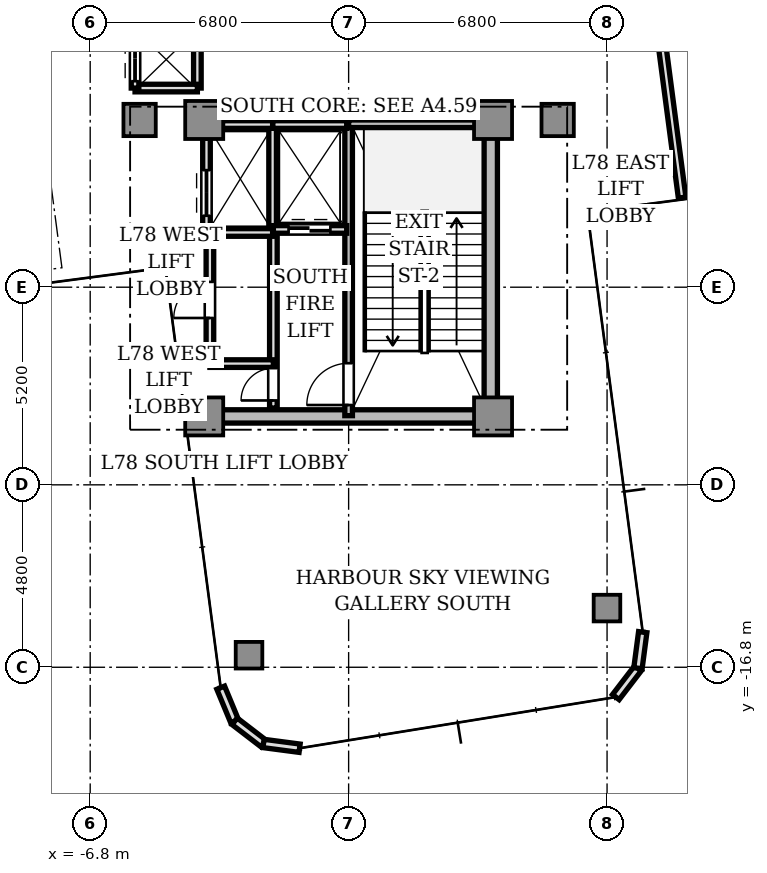
"""IFC4 building model, lengths in metres.
Left out: names, types, materials, properties, quantities, classifications, styles, units other than length and angle.
Written with IfcOpenShell. Run it as: python <this file> out.ifc"""

import sys

from ifc_helpers import new_model, si_unit, direction, frame, frame_2d, origin, origin_2d, place, context, subcontext, project, spatial, rectangle, extrude, source, transform, mapped, element, fill, save


model = new_model("IFC4")
c1 = context("Model", 3, precision=1e-05, world=origin(), true_north=direction((0.0, 1.0)))
c2 = subcontext(c1, "Body", "Model", "MODEL_VIEW")
j1 = project(units=[si_unit("LENGTHUNIT", "METRE"), si_unit("PLANEANGLEUNIT", "RADIAN")], contexts=[c1])
p1 = place(None, origin())
s1 = spatial("IfcSite", under=j1, at=p1, CompositionType="ELEMENT")
p2 = place(p1, origin())
s2 = spatial("IfcBuilding", under=s1, at=p2, CompositionType="ELEMENT")
p3 = place(p2, frame((0.0, 0.0, 280.3)))
s3 = spatial("IfcBuildingStorey", under=s2, at=p3, CompositionType="ELEMENT", Elevation=280.3)
p4 = place(p3, frame((-3.55, -10.2, 0.0), z_axis=(0.0, 0.0, 1.0), x_axis=(1.0, 0.0, 0.0)))
e1 = element("IfcWall", 1, at=p4, inside=s3, PredefinedType="SHEAR", context=c2, shape_type="SweptSolid", body=[
    extrude(rectangle(XDim=7.1, YDim=0.35, at=frame_2d((3.55, 0.0))), origin(), (0.0, 0.0, 1.0), 4.5),
])
p5 = place(p3, frame((3.74, -9.75, 0.0), z_axis=(0.0, 0.0, 1.0), x_axis=(0.0, 1.0, 0.0)))
e2 = element("IfcWall", 2, at=p5, inside=s3, PredefinedType="SHEAR", context=c2, shape_type="SweptSolid", body=[
    extrude(rectangle(XDim=6.9, YDim=0.35, at=frame_2d((3.45, 0.0))), origin(), (0.0, 0.0, 1.0), 4.5),
])
m1 = source(origin(), c2, "Body", "SweptSolid", [
    extrude(rectangle(XDim=1.0, YDim=1.0, at=origin_2d()), origin(), (0.0, 0.0, 1.0), 4.5),
])
for number, where, z_axis, x_axis in (
    (3, (-3.8, -2.4, 0.0), (0.0, 0.0, 1.0), (1.0, 0.0, 0.0)),
    (4, (3.8, -2.4, 0.0), (0.0, 0.0, 1.0), (1.0, 0.0, 0.0)),
    (5, (-3.8, -10.2, 0.0), (0.0, 0.0, 1.0), (1.0, 0.0, 0.0)),
    (6, (3.8, -10.2, 0.0), (0.0, 0.0, 1.0), (1.0, 0.0, 0.0)),
):
    element("IfcColumn", number, at=place(p3, frame(where, z_axis=z_axis, x_axis=x_axis)), inside=s3, PredefinedType="COLUMN", context=c2, shape_type="MappedRepresentation", body=[
        mapped(m1, transform((0.0, 0.0, 0.0), scale=1.0)),
    ])
m2 = source(origin(), c2, "Body", "SweptSolid", [
    extrude(rectangle(XDim=0.85, YDim=0.85, at=origin_2d()), origin(), (0.0, 0.0, 1.0), 4.5),
])
for number, where, z_axis, x_axis in (
    (7, (5.5, -2.4, 0.0), (0.0, 0.0, 1.0), (1.0, 0.0, 0.0)),
    (8, (-5.5, -2.4, 0.0), (0.0, 0.0, 1.0), (1.0, 0.0, 0.0)),
):
    element("IfcColumn", number, at=place(p3, frame(where, z_axis=z_axis, x_axis=x_axis)), inside=s3, PredefinedType="COLUMN", context=c2, shape_type="MappedRepresentation", body=[
        mapped(m2, transform((0.0, 0.0, 0.0), scale=1.0)),
    ])
m3 = source(origin(), c2, "Body", "SweptSolid", [
    extrude(rectangle(XDim=0.7, YDim=0.7, at=origin_2d()), origin(), (0.0, 0.0, 1.0), 4.5),
])
for number, where, z_axis, x_axis in (
    (9, (-2.621, -16.483, 0.0), (0.0, 0.0, 1.0), (1.0, 0.0, 0.0)),
    (10, (6.798, -15.243, 0.0), (0.0, 0.0, 1.0), (1.0, 0.0, 0.0)),
):
    element("IfcColumn", number, at=place(p3, frame(where, z_axis=z_axis, x_axis=x_axis)), inside=s3, PredefinedType="COLUMN", context=c2, shape_type="MappedRepresentation", body=[
        mapped(m3, transform((0.0, 0.0, 0.0), scale=1.0)),
    ])
for number, where, z_axis, x_axis in (
    (11, (-3.366, -17.338, 0.0), (0.0, 0.0, 1.0), (0.383, -0.924, 0.0)),
    (12, (-2.999, -18.222, 0.0), (0.0, 0.0, 1.0), (0.793, -0.609, 0.0)),
    (13, (-2.24, -18.805, 0.0), (0.0, 0.0, 1.0), (0.991, -0.131, 0.0)),
):
    element("IfcWall", number, at=place(p3, frame(where, z_axis=z_axis, x_axis=x_axis)), inside=s3, PredefinedType="STANDARD", context=c2, shape_type="SweptSolid", body=[
        extrude(rectangle(XDim=0.958, YDim=0.22, at=frame_2d((0.479, 0.0))), origin(), (0.0, 0.0, 1.0), 4.5),
    ])
p6 = place(p3, frame((7.031, -17.585, 0.0), z_axis=(0.0, 0.0, 1.0), x_axis=(0.60861352168, 0.793466811674, 0.0)))
e14 = element("IfcWall", 14, at=p6, inside=s3, PredefinedType="STANDARD", context=c2, shape_type="SweptSolid", body=[
    extrude(rectangle(XDim=0.958, YDim=0.22, at=frame_2d((0.479, 0.0))), origin(), (0.0, 0.0, 1.0), 4.5),
])
p7 = place(p3, frame((7.613, -16.825, 0.0), z_axis=(0.0, 0.0, 1.0), x_axis=(0.130527053476, 0.991444747987, 0.0)))
e15 = element("IfcWall", 15, at=p7, inside=s3, PredefinedType="STANDARD", context=c2, shape_type="SweptSolid", body=[
    extrude(rectangle(XDim=0.958, YDim=0.22, at=frame_2d((0.479, 0.0))), origin(), (0.0, 0.0, 1.0), 4.5),
])
p8 = place(p3, frame((0.0, -10.18, 0.0), z_axis=(0.0, 0.0, 1.0), x_axis=(0.0, 1.0, 0.0)))
e16 = element("IfcWall", 16, at=p8, inside=s3, PredefinedType="SOLIDWALL", context=c2, shape_type="SweptSolid", body=[
    extrude(rectangle(XDim=7.68, YDim=0.2, at=frame_2d((3.84, 0.0))), origin(), (0.0, 0.0, 1.0), 4.5),
])
p9 = place(p8, frame((0.28, 0.0, 0.0)))
e17 = element("IfcOpeningElement", 17, at=p9, cuts=e16, PredefinedType="OPENING", context=c2, shape_type="SweptSolid", body=[
    extrude(rectangle(XDim=1.1, YDim=2.15, at=frame_2d((0.55, 1.075))), frame((0.0, 0.11, 0.0), z_axis=(0.0, -1.0, 0.0), x_axis=(1.0, 0.0, 0.0)), (0.0, 0.0, 1.0), 0.22),
])
p10 = place(p3, frame((0.0, -2.5, 0.0), z_axis=(0.0, 0.0, 1.0), x_axis=(1.0, 0.0, 0.0)))
e18 = element("IfcWall", 18, at=p10, inside=s3, PredefinedType="SOLIDWALL", context=c2, shape_type="SweptSolid", body=[
    extrude(rectangle(XDim=3.72, YDim=0.2, at=frame_2d((1.86, 0.0))), origin(), (0.0, 0.0, 1.0), 4.5),
])
p11 = place(p3, frame((-1.98, -9.98, 0.0), z_axis=(0.0, 0.0, 1.0), x_axis=(0.0, 1.0, 0.0)))
e19 = element("IfcWall", 19, at=p11, inside=s3, PredefinedType="SOLIDWALL", context=c2, shape_type="SweptSolid", body=[
    extrude(rectangle(XDim=4.66, YDim=0.2, at=frame_2d((2.33, 0.0))), origin(), (0.0, 0.0, 1.0), 4.05),
])
p12 = place(p11, frame((0.2, 0.0, 0.0)))
e20 = element("IfcOpeningElement", 20, at=p12, cuts=e19, PredefinedType="OPENING", context=c2, shape_type="SweptSolid", body=[
    extrude(rectangle(XDim=0.85, YDim=2.1, at=frame_2d((0.425, 1.05))), frame((0.0, 0.11, 0.0), z_axis=(0.0, -1.0, 0.0), x_axis=(1.0, 0.0, 0.0)), (0.0, 0.0, 1.0), 0.22),
])
p13 = place(p3, frame((-2.0, -5.28, 0.0), z_axis=(0.0, 0.0, 1.0), x_axis=(0.0, 1.0, 0.0)))
e21 = element("IfcWall", 21, at=p13, inside=s3, PredefinedType="SOLIDWALL", context=c2, shape_type="SweptSolid", body=[
    extrude(rectangle(XDim=2.78, YDim=0.2, at=frame_2d((1.39, 0.0))), origin(), (0.0, 0.0, 1.0), 4.05),
])
p14 = place(p3, frame((-2.0, -2.52, 0.0), z_axis=(0.0, 0.0, 1.0), x_axis=(1.0, 0.0, 0.0)))
e22 = element("IfcWall", 22, at=p14, inside=s3, PredefinedType="SOLIDWALL", context=c2, shape_type="SweptSolid", body=[
    extrude(rectangle(XDim=1.95, YDim=0.2, at=frame_2d((0.975, 0.0))), origin(), (0.0, 0.0, 1.0), 4.05),
])
p15 = place(p3, frame((-1.98, -5.28, 0.0), z_axis=(0.0, 0.0, 1.0), x_axis=(1.0, 0.0, 0.0)))
e23 = element("IfcWall", 23, at=p15, inside=s3, PredefinedType="SOLIDWALL", context=c2, shape_type="SweptSolid", body=[
    extrude(rectangle(XDim=1.93, YDim=0.2, at=frame_2d((0.965, 0.0))), origin(), (0.0, 0.0, 1.0), 4.05),
])
p16 = place(p15, frame((0.4, 0.0, 0.0)))
e24 = element("IfcOpeningElement", 24, at=p16, cuts=e23, PredefinedType="OPENING", context=c2, shape_type="SweptSolid", body=[
    extrude(rectangle(XDim=1.1, YDim=2.2, at=frame_2d((0.55, 1.1))), frame((0.0, 0.11, 0.0), z_axis=(0.0, -1.0, 0.0), x_axis=(1.0, 0.0, 0.0)), (0.0, 0.0, 1.0), 0.22),
])
p17 = place(p3, frame((-3.32, -2.52, 0.0), z_axis=(0.0, 0.0, 1.0), x_axis=(1.0, 0.0, 0.0)))
e25 = element("IfcWall", 25, at=p17, inside=s3, PredefinedType="SOLIDWALL", context=c2, shape_type="SweptSolid", body=[
    extrude(rectangle(XDim=1.32, YDim=0.2, at=frame_2d((0.66, 0.0))), origin(), (0.0, 0.0, 1.0), 4.05),
])
p18 = place(p3, frame((-3.74, -5.36, 0.0), z_axis=(0.0, 0.0, 1.0), x_axis=(1.0, 0.0, 0.0)))
e26 = element("IfcWall", 26, at=p18, inside=s3, PredefinedType="SOLIDWALL", context=c2, shape_type="SweptSolid", body=[
    extrude(rectangle(XDim=1.74, YDim=0.2, at=frame_2d((0.87, 0.0))), origin(), (0.0, 0.0, 1.0), 4.05),
])
p19 = place(p3, frame((-3.74, -5.36, 0.0), z_axis=(0.0, 0.0, 1.0), x_axis=(0.0, 1.0, 0.0)))
e27 = element("IfcWall", 27, at=p19, inside=s3, PredefinedType="SOLIDWALL", context=c2, shape_type="SweptSolid", body=[
    extrude(rectangle(XDim=2.48, YDim=0.2, at=frame_2d((1.24, 0.0))), origin(), (0.0, 0.0, 1.0), 4.05),
])
p20 = place(p19, frame((0.44, 0.0, 0.0)))
e28 = element("IfcOpeningElement", 28, at=p20, cuts=e27, PredefinedType="OPENING", context=c2, shape_type="SweptSolid", body=[
    extrude(rectangle(XDim=1.2, YDim=2.2, at=frame_2d((0.6, 1.1))), frame((0.0, 0.11, 0.0), z_axis=(0.0, -1.0, 0.0), x_axis=(1.0, 0.0, 0.0)), (0.0, 0.0, 1.0), 0.22),
])
p21 = place(p3, frame((-3.98, -1.56, 0.0), z_axis=(0.0, 0.0, 1.0), x_axis=(0.0, 1.0, 0.0)))
e29 = element("IfcWall", 29, at=p21, inside=s3, PredefinedType="SOLIDWALL", context=c2, shape_type="SweptSolid", body=[
    extrude(rectangle(XDim=3.12, YDim=0.2, at=frame_2d((1.56, 0.0))), origin(), (0.0, 0.0, 1.0), 3.72),
])
p22 = place(p3, frame((-5.62, -1.56, 0.0), z_axis=(0.0, 0.0, 1.0), x_axis=(1.0, 0.0, 0.0)))
e30 = element("IfcWall", 30, at=p22, inside=s3, PredefinedType="SOLIDWALL", context=c2, shape_type="SweptSolid", body=[
    extrude(rectangle(XDim=1.64, YDim=0.2, at=frame_2d((0.82, 0.0))), origin(), (0.0, 0.0, 1.0), 4.05),
])
p23 = place(p3, frame((-5.62, -1.56, 0.0), z_axis=(0.0, 0.0, 1.0), x_axis=(0.0, 1.0, 0.0)))
e31 = element("IfcWall", 31, at=p23, inside=s3, PredefinedType="SOLIDWALL", context=c2, shape_type="SweptSolid", body=[
    extrude(rectangle(XDim=1.56, YDim=0.2, at=frame_2d((0.78, 0.0))), origin(), (0.0, 0.0, 1.0), 4.05),
])
p24 = place(p23, frame((0.18, 0.0, 0.0)))
e32 = element("IfcOpeningElement", 32, at=p24, cuts=e31, PredefinedType="OPENING", context=c2, shape_type="SweptSolid", body=[
    extrude(rectangle(XDim=1.2, YDim=2.2, at=frame_2d((0.6, 1.1))), frame((0.0, 0.11, 0.0), z_axis=(0.0, -1.0, 0.0), x_axis=(1.0, 0.0, 0.0)), (0.0, 0.0, 1.0), 0.22),
])
p25 = place(p3, frame((-3.65, -8.81, 0.0), z_axis=(0.0, 0.0, 1.0), x_axis=(0.0, 1.0, 0.0)))
e33 = element("IfcWall", 33, at=p25, inside=s3, PredefinedType="SOLIDWALL", context=c2, shape_type="SweptSolid", body=[
    extrude(rectangle(XDim=3.43, YDim=0.2, at=frame_2d((1.715, 0.0))), origin(), (0.0, 0.0, 1.0), 4.05),
])
p26 = place(p25, frame((1.2, 0.0, 0.0)))
e34 = element("IfcOpeningElement", 34, at=p26, cuts=e33, PredefinedType="OPENING", context=c2, shape_type="SweptSolid", body=[
    extrude(rectangle(XDim=0.95, YDim=2.15, at=frame_2d((0.475, 1.075))), frame((0.0, 0.11, 0.0), z_axis=(0.0, -1.0, 0.0), x_axis=(1.0, 0.0, 0.0)), (0.0, 0.0, 1.0), 0.22),
])
p27 = place(p3, frame((-3.65, -8.81, 0.0), z_axis=(0.0, 0.0, 1.0), x_axis=(1.0, 0.0, 0.0)))
e35 = element("IfcWall", 35, at=p27, inside=s3, PredefinedType="SOLIDWALL", context=c2, shape_type="SweptSolid", body=[
    extrude(rectangle(XDim=1.67, YDim=0.2, at=frame_2d((0.835, 0.0))), origin(), (0.0, 0.0, 1.0), 4.05),
])
p28 = place(p3, frame((8.775, -4.443, 0.0), z_axis=(0.0, 0.0, 1.0), x_axis=(-0.130515390239, 0.991446283422, 0.0)))
e36 = element("IfcWall", 36, at=p28, inside=s3, PredefinedType="SOLIDWALL", context=c2, shape_type="SweptSolid", body=[
    extrude(rectangle(XDim=11.1, YDim=0.2, at=frame_2d((5.55, 0.0))), origin(), (0.0, 0.0, 1.0), 4.05),
])
p29 = place(p28, frame((4.95, 0.0, 0.0)))
e37 = element("IfcOpeningElement", 37, at=p29, cuts=e36, PredefinedType="OPENING", context=c2, shape_type="SweptSolid", body=[
    extrude(rectangle(XDim=1.2, YDim=2.2, at=frame_2d((0.6, 1.1))), frame((0.0, 0.11, 0.0), z_axis=(0.0, -1.0, 0.0), x_axis=(1.0, 0.0, 0.0)), (0.0, 0.0, 1.0), 0.22),
])
m4 = source(origin(), c2, "Body", "SweptSolid", [
    extrude(rectangle(XDim=1.1, YDim=0.05, at=origin_2d()), origin(), (0.0, 0.0, 1.0), 2.15),
])
p30 = place(p9, frame((0.55, 0.0, 0.0)))
e38 = element("IfcDoor", 38, at=p30, inside=s3, OperationType="SINGLE_SWING_LEFT", PredefinedType="DOOR", context=c2, shape_type="MappedRepresentation", body=[
    mapped(m4, transform((0.0, 0.0, 0.0), scale=1.0)),
])
fill(e17, e38)
m5 = source(origin(), c2, "Body", "SweptSolid", [
    extrude(rectangle(XDim=0.85, YDim=0.05, at=origin_2d()), origin(), (0.0, 0.0, 1.0), 2.1),
])
p31 = place(p12, frame((0.425, 0.0, 0.0)))
e39 = element("IfcDoor", 39, at=p31, inside=s3, OperationType="SINGLE_SWING_LEFT", PredefinedType="DOOR", context=c2, shape_type="MappedRepresentation", body=[
    mapped(m5, transform((0.0, 0.0, 0.0), scale=1.0)),
])
fill(e20, e39)
m6 = source(origin(), c2, "Body", "SweptSolid", [
    extrude(rectangle(XDim=1.1, YDim=0.05, at=origin_2d()), origin(), (0.0, 0.0, 1.0), 2.2),
])
p32 = place(p16, frame((0.55, 0.0, 0.0)))
e40 = element("IfcDoor", 40, at=p32, inside=s3, OperationType="DOUBLE_DOOR_SLIDING", PredefinedType="DOOR", context=c2, shape_type="MappedRepresentation", body=[
    mapped(m6, transform((0.0, 0.0, 0.0), scale=1.0)),
])
fill(e24, e40)
m7 = source(origin(), c2, "Body", "SweptSolid", [
    extrude(rectangle(XDim=1.2, YDim=0.05, at=origin_2d()), origin(), (0.0, 0.0, 1.0), 2.2),
])
p33 = place(p20, frame((0.6, 0.0, 0.0)))
e41 = element("IfcDoor", 41, at=p33, inside=s3, OperationType="DOUBLE_DOOR_SLIDING", PredefinedType="DOOR", context=c2, shape_type="MappedRepresentation", body=[
    mapped(m7, transform((0.0, 0.0, 0.0), scale=1.0)),
])
fill(e28, e41)
p34 = place(p24, frame((0.6, 0.0, 0.0)))
e42 = element("IfcDoor", 42, at=p34, inside=s3, OperationType="DOUBLE_DOOR_SLIDING", PredefinedType="DOOR", context=c2, shape_type="MappedRepresentation", body=[
    mapped(m7, transform((0.0, 0.0, 0.0), scale=1.0)),
])
fill(e32, e42)
m8 = source(origin(), c2, "Body", "SweptSolid", [
    extrude(rectangle(XDim=0.95, YDim=0.05, at=origin_2d()), origin(), (0.0, 0.0, 1.0), 2.15),
])
p35 = place(p26, frame((0.475, 0.0, 0.0)))
e43 = element("IfcDoor", 43, at=p35, inside=s3, OperationType="SINGLE_SWING_LEFT", PredefinedType="DOOR", context=c2, shape_type="MappedRepresentation", body=[
    mapped(m8, transform((0.0, 0.0, 0.0), scale=1.0)),
])
fill(e34, e43)
save(model, sys.argv[1])
